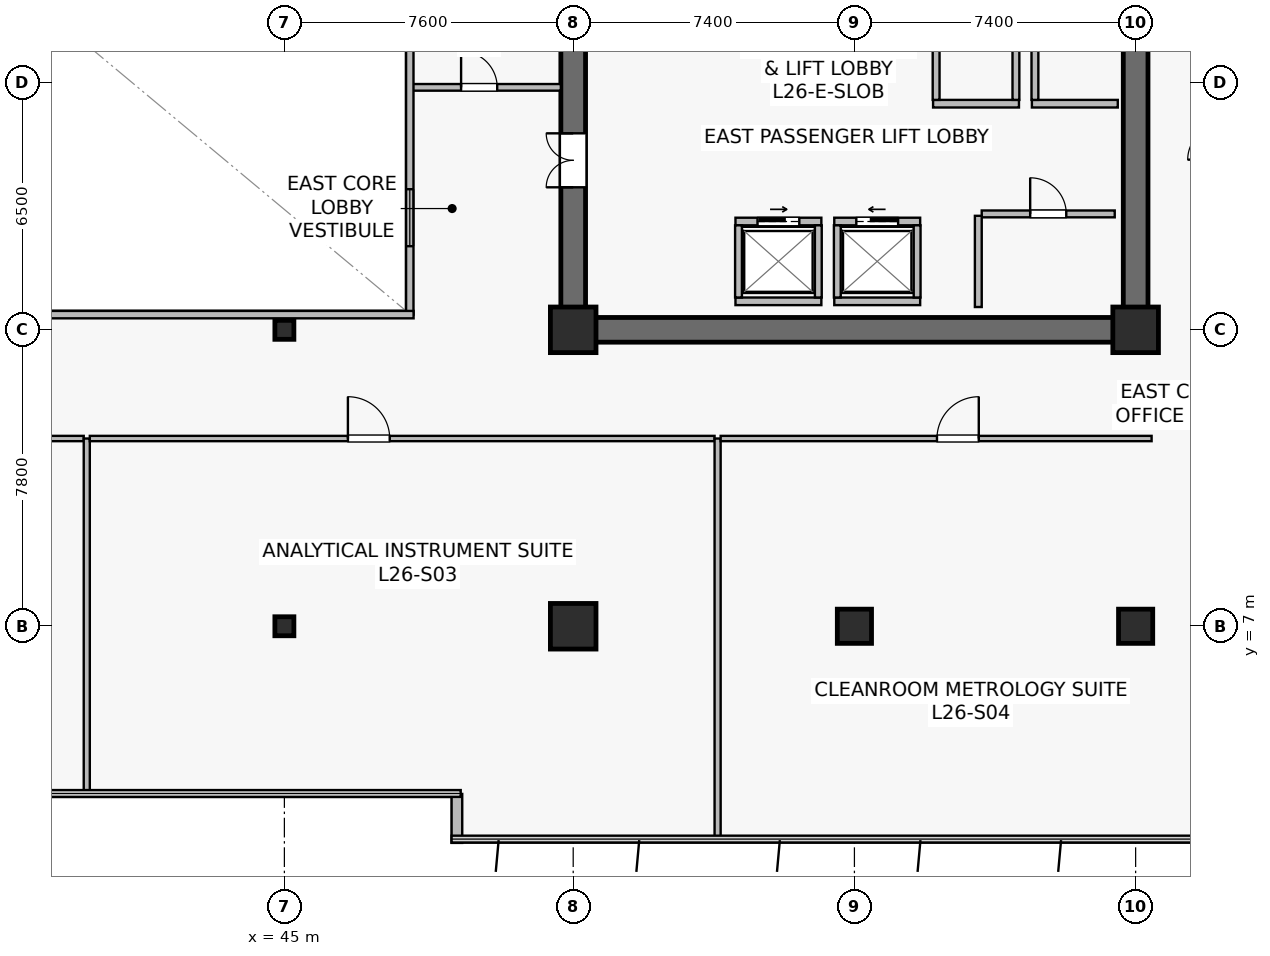
"""IFC4 building model, lengths in metres.
Left out: names, types, materials, properties, quantities, classifications, styles, units other than length and angle.
Written with IfcOpenShell. Run it as: python <this file> out.ifc"""

import sys

from ifc_helpers import new_model, si_unit, direction, frame, frame_2d, origin, origin_2d, place, context, subcontext, project, spatial, rectangle, hollow_rectangle, extrude, source, transform, mapped, element, fill, save


model = new_model("IFC4")
c1 = context("Model", 3, precision=1e-05, world=origin(), true_north=direction((0.0, 1.0)))
c2 = subcontext(c1, "Body", "Model", "MODEL_VIEW")
j1 = project(units=[si_unit("LENGTHUNIT", "METRE"), si_unit("PLANEANGLEUNIT", "RADIAN")], contexts=[c1])
p1 = place(None, origin())
s1 = spatial("IfcSite", under=j1, at=p1, CompositionType="ELEMENT")
p2 = place(p1, origin())
s2 = spatial("IfcBuilding", under=s1, at=p2, CompositionType="ELEMENT")
p3 = place(p2, frame((0.0, 0.0, 109.2)))
s3 = spatial("IfcBuildingStorey", under=s2, at=p3, CompositionType="ELEMENT", Elevation=109.2)
p4 = place(p3, frame((52.275, 14.8, 0.0), z_axis=(0.0, 0.0, 1.0), x_axis=(1.0, 0.0, 0.0)))
e1 = element("IfcWall", 1, at=p4, inside=s3, PredefinedType="SHEAR", context=c2, shape_type="SweptSolid", body=[
    extrude(rectangle(XDim=15.45, YDim=0.65, at=frame_2d((7.725, 0.0))), origin(), (0.0, 0.0, 1.0), 3.79),
])
p5 = place(p3, frame((52.6, 15.125, 0.0), z_axis=(0.0, 0.0, 1.0), x_axis=(0.0, 1.0, 0.0)))
e2 = element("IfcWall", 2, at=p5, inside=s3, PredefinedType="SHEAR", context=c2, shape_type="SweptSolid", body=[
    extrude(rectangle(XDim=18.35, YDim=0.65, at=frame_2d((9.175, 0.0))), origin(), (0.0, 0.0, 1.0), 3.79),
])
p6 = place(p5, frame((3.425, 0.0, 0.0)))
e3 = element("IfcOpeningElement", 3, at=p6, cuts=e2, PredefinedType="OPENING", context=c2, shape_type="SweptSolid", body=[
    extrude(rectangle(XDim=1.42, YDim=2.2, at=frame_2d((0.71, 1.1))), frame((0.0, 0.335, 0.0), z_axis=(0.0, -1.0, 0.0), x_axis=(1.0, 0.0, 0.0)), (0.0, 0.0, 1.0), 0.67),
])
p7 = place(p3, frame((67.4, 15.125, 0.0), z_axis=(0.0, 0.0, 1.0), x_axis=(0.0, 1.0, 0.0)))
e4 = element("IfcWall", 4, at=p7, inside=s3, PredefinedType="SHEAR", context=c2, shape_type="SweptSolid", body=[
    extrude(rectangle(XDim=18.35, YDim=0.65, at=frame_2d((9.175, 0.0))), origin(), (0.0, 0.0, 1.0), 3.79),
])
m1 = source(origin(), c2, "Body", "SweptSolid", [
    extrude(rectangle(XDim=1.2, YDim=1.2, at=origin_2d()), origin(), (0.0, 0.0, 1.0), 4.1),
])
p8 = place(p3, frame((52.6, 7.0, 0.0), z_axis=(0.0, 0.0, 1.0), x_axis=(1.0, 0.0, 0.0)))
e5 = element("IfcColumn", 5, at=p8, inside=s3, PredefinedType="COLUMN", context=c2, shape_type="MappedRepresentation", body=[
    mapped(m1, transform((0.0, 0.0, 0.0), scale=1.0)),
])
m2 = source(origin(), c2, "Body", "SweptSolid", [
    extrude(rectangle(XDim=0.9, YDim=0.9, at=origin_2d()), origin(), (0.0, 0.0, 1.0), 4.1),
])
p9 = place(p3, frame((60.0, 7.0, 0.0), z_axis=(0.0, 0.0, 1.0), x_axis=(1.0, 0.0, 0.0)))
e6 = element("IfcColumn", 6, at=p9, inside=s3, PredefinedType="COLUMN", context=c2, shape_type="MappedRepresentation", body=[
    mapped(m2, transform((0.0, 0.0, 0.0), scale=1.0)),
])
for number, where, z_axis, x_axis in (
    (7, (52.6, 14.8, 0.0), (0.0, 0.0, 1.0), (1.0, 0.0, 0.0)),
    (8, (67.4, 14.8, 0.0), (0.0, 0.0, 1.0), (1.0, 0.0, 0.0)),
):
    element("IfcColumn", number, at=place(p3, frame(where, z_axis=z_axis, x_axis=x_axis)), inside=s3, PredefinedType="COLUMN", context=c2, shape_type="MappedRepresentation", body=[
        mapped(m1, transform((0.0, 0.0, 0.0), scale=1.0)),
    ])
p10 = place(p3, frame((67.4, 7.0, 0.0), z_axis=(0.0, 0.0, 1.0), x_axis=(1.0, 0.0, 0.0)))
e9 = element("IfcColumn", 9, at=p10, inside=s3, PredefinedType="COLUMN", context=c2, shape_type="MappedRepresentation", body=[
    mapped(m2, transform((0.0, 0.0, 0.0), scale=1.0)),
])
m3 = source(origin(), c2, "Body", "SweptSolid", [
    extrude(hollow_rectangle(XDim=0.5, YDim=0.5, WallThickness=0.022, at=origin_2d()), origin(), (0.0, 0.0, 1.0), 4.1),
])
for number, where, z_axis, x_axis in (
    (10, (45.0, 7.0, 0.0), (0.0, 0.0, 1.0), (1.0, 0.0, 0.0)),
    (11, (45.0, 14.8, 0.0), (0.0, 0.0, 1.0), (1.0, 0.0, 0.0)),
):
    element("IfcColumn", number, at=place(p3, frame(where, z_axis=z_axis, x_axis=x_axis)), inside=s3, PredefinedType="COLUMN", context=c2, shape_type="MappedRepresentation", body=[
        mapped(m3, transform((0.0, 0.0, 0.0), scale=1.0)),
    ])
p11 = place(p3, frame((49.54, 2.588, 0.0), z_axis=(0.0, 0.0, 1.0), x_axis=(0.0, -1.0, 0.0)))
e12 = element("IfcWall", 12, at=p11, inside=s3, PredefinedType="STANDARD", context=c2, shape_type="SweptSolid", body=[
    extrude(rectangle(XDim=1.288, YDim=0.28, at=frame_2d((0.644, 0.0))), origin(), (0.0, 0.0, 1.0), 3.79),
])
p12 = place(p3, frame((59.47, 17.65, 0.0), z_axis=(0.0, 0.0, 1.0), x_axis=(1.0, 0.0, 0.0)))
e13 = element("IfcWall", 13, at=p12, inside=s3, PredefinedType="SOLIDWALL", context=c2, shape_type="SweptSolid", body=[
    extrude(rectangle(XDim=2.26, YDim=0.2, at=frame_2d((1.13, 0.0))), origin(), (0.0, 0.0, 1.0), 3.125),
])
p13 = place(p12, frame((0.58, 0.0, 0.0)))
e14 = element("IfcOpeningElement", 14, at=p13, cuts=e13, PredefinedType="OPENING", context=c2, shape_type="SweptSolid", body=[
    extrude(rectangle(XDim=1.1, YDim=2.22, at=frame_2d((0.55, 1.11))), frame((0.0, 0.11, 0.0), z_axis=(0.0, -1.0, 0.0), x_axis=(1.0, 0.0, 0.0)), (0.0, 0.0, 1.0), 0.22),
])
p14 = place(p3, frame((59.47, 15.55, 0.0), z_axis=(0.0, 0.0, 1.0), x_axis=(1.0, 0.0, 0.0)))
e15 = element("IfcWall", 15, at=p14, inside=s3, PredefinedType="SOLIDWALL", context=c2, shape_type="SweptSolid", body=[
    extrude(rectangle(XDim=2.26, YDim=0.2, at=frame_2d((1.13, 0.0))), origin(), (0.0, 0.0, 1.0), 3.125),
])
for number, where, z_axis, x_axis in (
    (16, (59.55, 15.65, 0.0), (0.0, 0.0, 1.0), (0.0, 1.0, 0.0)),
    (17, (61.65, 15.65, 0.0), (0.0, 0.0, 1.0), (0.0, 1.0, 0.0)),
):
    element("IfcWall", number, at=place(p3, frame(where, z_axis=z_axis, x_axis=x_axis)), inside=s3, PredefinedType="SOLIDWALL", context=c2, shape_type="SweptSolid", body=[
        extrude(rectangle(XDim=1.9, YDim=0.18, at=frame_2d((0.95, 0.0))), origin(), (0.0, 0.0, 1.0), 3.79),
    ])
p15 = place(p3, frame((56.87, 17.65, 0.0), z_axis=(0.0, 0.0, 1.0), x_axis=(1.0, 0.0, 0.0)))
e18 = element("IfcWall", 18, at=p15, inside=s3, PredefinedType="SOLIDWALL", context=c2, shape_type="SweptSolid", body=[
    extrude(rectangle(XDim=2.26, YDim=0.2, at=frame_2d((1.13, 0.0))), origin(), (0.0, 0.0, 1.0), 3.79),
])
p16 = place(p15, frame((0.58, 0.0, 0.0)))
e19 = element("IfcOpeningElement", 19, at=p16, cuts=e18, PredefinedType="OPENING", context=c2, shape_type="SweptSolid", body=[
    extrude(rectangle(XDim=1.1, YDim=2.22, at=frame_2d((0.55, 1.11))), frame((0.0, 0.11, 0.0), z_axis=(0.0, -1.0, 0.0), x_axis=(1.0, 0.0, 0.0)), (0.0, 0.0, 1.0), 0.22),
])
p17 = place(p3, frame((56.87, 15.55, 0.0), z_axis=(0.0, 0.0, 1.0), x_axis=(1.0, 0.0, 0.0)))
e20 = element("IfcWall", 20, at=p17, inside=s3, PredefinedType="SOLIDWALL", context=c2, shape_type="SweptSolid", body=[
    extrude(rectangle(XDim=2.26, YDim=0.2, at=frame_2d((1.13, 0.0))), origin(), (0.0, 0.0, 1.0), 3.79),
])
for number, where, z_axis, x_axis in (
    (21, (56.95, 15.65, 0.0), (0.0, 0.0, 1.0), (0.0, 1.0, 0.0)),
    (22, (59.05, 15.65, 0.0), (0.0, 0.0, 1.0), (0.0, 1.0, 0.0)),
):
    element("IfcWall", number, at=place(p3, frame(where, z_axis=z_axis, x_axis=x_axis)), inside=s3, PredefinedType="SOLIDWALL", context=c2, shape_type="SweptSolid", body=[
        extrude(rectangle(XDim=1.9, YDim=0.18, at=frame_2d((0.95, 0.0))), origin(), (0.0, 0.0, 1.0), 3.79),
    ])
p18 = place(p3, frame((64.67, 20.75, 0.0), z_axis=(0.0, 0.0, 1.0), x_axis=(1.0, 0.0, 0.0)))
e23 = element("IfcWall", 23, at=p18, inside=s3, PredefinedType="SOLIDWALL", context=c2, shape_type="SweptSolid", body=[
    extrude(rectangle(XDim=2.26, YDim=0.2, at=frame_2d((1.13, 0.0))), origin(), (0.0, 0.0, 1.0), 3.79),
])
p19 = place(p3, frame((64.75, 20.85, 0.0), z_axis=(0.0, 0.0, 1.0), x_axis=(0.0, 1.0, 0.0)))
e24 = element("IfcWall", 24, at=p19, inside=s3, PredefinedType="SOLIDWALL", context=c2, shape_type="SweptSolid", body=[
    extrude(rectangle(XDim=1.9, YDim=0.18, at=frame_2d((0.95, 0.0))), origin(), (0.0, 0.0, 1.0), 3.79),
])
p20 = place(p3, frame((62.07, 20.75, 0.0), z_axis=(0.0, 0.0, 1.0), x_axis=(1.0, 0.0, 0.0)))
e25 = element("IfcWall", 25, at=p20, inside=s3, PredefinedType="SOLIDWALL", context=c2, shape_type="SweptSolid", body=[
    extrude(rectangle(XDim=2.26, YDim=0.2, at=frame_2d((1.13, 0.0))), origin(), (0.0, 0.0, 1.0), 3.79),
])
for number, where, z_axis, x_axis in (
    (26, (62.15, 20.85, 0.0), (0.0, 0.0, 1.0), (0.0, 1.0, 0.0)),
    (27, (64.25, 20.85, 0.0), (0.0, 0.0, 1.0), (0.0, 1.0, 0.0)),
):
    element("IfcWall", number, at=place(p3, frame(where, z_axis=z_axis, x_axis=x_axis)), inside=s3, PredefinedType="SOLIDWALL", context=c2, shape_type="SweptSolid", body=[
        extrude(rectangle(XDim=1.9, YDim=0.18, at=frame_2d((0.95, 0.0))), origin(), (0.0, 0.0, 1.0), 3.79),
    ])
p21 = place(p3, frame((63.35, 17.85, 0.0), z_axis=(0.0, 0.0, 1.0), x_axis=(1.0, 0.0, 0.0)))
e28 = element("IfcWall", 28, at=p21, inside=s3, PredefinedType="SOLIDWALL", context=c2, shape_type="SweptSolid", body=[
    extrude(rectangle(XDim=3.5, YDim=0.18, at=frame_2d((1.75, 0.0))), origin(), (0.0, 0.0, 1.0), 3.79),
])
p22 = place(p21, frame((1.275, 0.0, 0.0)))
e29 = element("IfcOpeningElement", 29, at=p22, cuts=e28, PredefinedType="OPENING", context=c2, shape_type="SweptSolid", body=[
    extrude(rectangle(XDim=0.95, YDim=2.15, at=frame_2d((0.475, 1.075))), frame((0.0, 0.1, 0.0), z_axis=(0.0, -1.0, 0.0), x_axis=(1.0, 0.0, 0.0)), (0.0, 0.0, 1.0), 0.2),
])
p23 = place(p3, frame((63.26, 15.4, 0.0), z_axis=(0.0, 0.0, 1.0), x_axis=(0.0, 1.0, 0.0)))
e30 = element("IfcWall", 30, at=p23, inside=s3, PredefinedType="SOLIDWALL", context=c2, shape_type="SweptSolid", body=[
    extrude(rectangle(XDim=2.4, YDim=0.18, at=frame_2d((1.2, 0.0))), origin(), (0.0, 0.0, 1.0), 3.79),
])
p24 = place(p3, frame((48.3, 21.18, 0.0), z_axis=(0.0, 0.0, 1.0), x_axis=(1.0, 0.0, 0.0)))
e31 = element("IfcWall", 31, at=p24, inside=s3, PredefinedType="PARTITIONING", context=c2, shape_type="SweptSolid", body=[
    extrude(rectangle(XDim=3.975, YDim=0.175, at=frame_2d((1.987, 0.0))), origin(), (0.0, 0.0, 1.0), 3.79),
])
p25 = place(p24, frame((1.35, 0.0, 0.0)))
e32 = element("IfcOpeningElement", 32, at=p25, cuts=e31, PredefinedType="OPENING", context=c2, shape_type="SweptSolid", body=[
    extrude(rectangle(XDim=0.95, YDim=2.15, at=frame_2d((0.475, 1.075))), frame((0.0, 0.098, 0.0), z_axis=(0.0, -1.0, 0.0), x_axis=(1.0, 0.0, 0.0)), (0.0, 0.0, 1.0), 0.195),
])
p26 = place(p3, frame((48.3, 15.2, 0.0), z_axis=(0.0, 0.0, 1.0), x_axis=(0.0, 1.0, 0.0)))
e33 = element("IfcWall", 33, at=p26, inside=s3, PredefinedType="SOLIDWALL", context=c2, shape_type="SweptSolid", body=[
    extrude(rectangle(XDim=18.2, YDim=0.195, at=frame_2d((9.1, 0.0))), origin(), (0.0, 0.0, 1.0), 3.79),
])
p27 = place(p26, frame((1.8, 0.0, 0.9)))
e34 = element("IfcOpeningElement", 34, at=p27, cuts=e33, PredefinedType="OPENING", context=c2, shape_type="SweptSolid", body=[
    extrude(rectangle(XDim=1.5, YDim=1.4, at=frame_2d((0.75, 0.7))), frame((0.0, 0.107, 0.0), z_axis=(0.0, -1.0, 0.0), x_axis=(1.0, 0.0, 0.0)), (0.0, 0.0, 1.0), 0.215),
])
p28 = place(p26, frame((13.2, 0.0, 0.9)))
e35 = element("IfcOpeningElement", 35, at=p28, cuts=e33, PredefinedType="OPENING", context=c2, shape_type="SweptSolid", body=[
    extrude(rectangle(XDim=1.5, YDim=1.4, at=frame_2d((0.75, 0.7))), frame((0.0, 0.107, 0.0), z_axis=(0.0, -1.0, 0.0), x_axis=(1.0, 0.0, 0.0)), (0.0, 0.0, 1.0), 0.215),
])
p29 = place(p3, frame((26.4, 15.2, 0.0), z_axis=(0.0, 0.0, 1.0), x_axis=(1.0, 0.0, 0.0)))
e36 = element("IfcWall", 36, at=p29, inside=s3, PredefinedType="SOLIDWALL", context=c2, shape_type="SweptSolid", body=[
    extrude(rectangle(XDim=22.0, YDim=0.195, at=frame_2d((11.0, 0.0))), origin(), (0.0, 0.0, 1.0), 3.79),
])
p30 = place(p3, frame((20.68, 11.94, 0.0), z_axis=(0.0, 0.0, 1.0), x_axis=(1.0, 0.0, 0.0)))
e37 = element("IfcWall", 37, at=p30, inside=s3, PredefinedType="PARTITIONING", context=c2, shape_type="SweptSolid", body=[
    extrude(rectangle(XDim=19.04, YDim=0.14, at=frame_2d((9.52, 0.0))), origin(), (0.0, 0.0, 1.0), 3.125),
])
p31 = place(p30, frame((10.004, 0.0, 0.0)))
e38 = element("IfcOpeningElement", 38, at=p31, cuts=e37, PredefinedType="OPENING", context=c2, shape_type="SweptSolid", body=[
    extrude(rectangle(XDim=1.1, YDim=2.18, at=frame_2d((0.55, 1.09))), frame((0.0, 0.08, 0.0), z_axis=(0.0, -1.0, 0.0), x_axis=(1.0, 0.0, 0.0)), (0.0, 0.0, 1.0), 0.16),
])
p32 = place(p3, frame((39.8, 2.61, 0.0), z_axis=(0.0, 0.0, 1.0), x_axis=(0.0, 1.0, 0.0)))
e39 = element("IfcWall", 39, at=p32, inside=s3, PredefinedType="PARTITIONING", context=c2, shape_type="SweptSolid", body=[
    extrude(rectangle(XDim=9.33, YDim=0.16, at=frame_2d((4.665, 0.0))), origin(), (0.0, 0.0, 1.0), 3.075),
])
p33 = place(p3, frame((39.88, 11.94, 0.0), z_axis=(0.0, 0.0, 1.0), x_axis=(1.0, 0.0, 0.0)))
e40 = element("IfcWall", 40, at=p33, inside=s3, PredefinedType="PARTITIONING", context=c2, shape_type="SweptSolid", body=[
    extrude(rectangle(XDim=16.44, YDim=0.14, at=frame_2d((8.22, 0.0))), origin(), (0.0, 0.0, 1.0), 3.125),
])
p34 = place(p33, frame((6.792, 0.0, 0.0)))
e41 = element("IfcOpeningElement", 41, at=p34, cuts=e40, PredefinedType="OPENING", context=c2, shape_type="SweptSolid", body=[
    extrude(rectangle(XDim=1.1, YDim=2.18, at=frame_2d((0.55, 1.09))), frame((0.0, 0.08, 0.0), z_axis=(0.0, -1.0, 0.0), x_axis=(1.0, 0.0, 0.0)), (0.0, 0.0, 1.0), 0.16),
])
p35 = place(p3, frame((56.4, 1.41, 0.0), z_axis=(0.0, 0.0, 1.0), x_axis=(0.0, 1.0, 0.0)))
e42 = element("IfcWall", 42, at=p35, inside=s3, PredefinedType="PARTITIONING", context=c2, shape_type="SweptSolid", body=[
    extrude(rectangle(XDim=10.53, YDim=0.16, at=frame_2d((5.265, 0.0))), origin(), (0.0, 0.0, 1.0), 3.075),
])
p36 = place(p3, frame((56.48, 11.94, 0.0), z_axis=(0.0, 0.0, 1.0), x_axis=(1.0, 0.0, 0.0)))
e43 = element("IfcWall", 43, at=p36, inside=s3, PredefinedType="PARTITIONING", context=c2, shape_type="SweptSolid", body=[
    extrude(rectangle(XDim=11.34, YDim=0.14, at=frame_2d((5.67, 0.0))), origin(), (0.0, 0.0, 1.0), 3.125),
])
p37 = place(p36, frame((5.692, 0.0, 0.0)))
e44 = element("IfcOpeningElement", 44, at=p37, cuts=e43, PredefinedType="OPENING", context=c2, shape_type="SweptSolid", body=[
    extrude(rectangle(XDim=1.1, YDim=2.18, at=frame_2d((0.55, 1.09))), frame((0.0, 0.08, 0.0), z_axis=(0.0, -1.0, 0.0), x_axis=(1.0, 0.0, 0.0)), (0.0, 0.0, 1.0), 0.16),
])
m4 = source(origin(), c2, "Body", "SweptSolid", [
    extrude(rectangle(XDim=1.5, YDim=1.4, at=frame_2d((0.75, 0.7))), frame((0.0, 0.03, 0.0), z_axis=(0.0, -1.0, 0.0), x_axis=(1.0, 0.0, 0.0)), (0.0, 0.0, 1.0), 0.06),
])
p38 = place(p27, origin())
e45 = element("IfcWindow", 45, at=p38, inside=s3, PartitioningType="SINGLE_PANEL", PredefinedType="WINDOW", context=c2, shape_type="MappedRepresentation", body=[
    mapped(m4, transform((0.0, 0.0, 0.0), scale=1.0)),
])
fill(e34, e45)
m5 = source(origin(), c2, "Body", "SweptSolid", [
    extrude(rectangle(XDim=1.1, YDim=2.22, at=frame_2d((0.55, 1.11))), frame((0.0, 0.025, 0.0), z_axis=(0.0, -1.0, 0.0), x_axis=(1.0, 0.0, 0.0)), (0.0, 0.0, 1.0), 0.05),
])
p39 = place(p13, origin())
e46 = element("IfcDoor", 46, at=p39, inside=s3, OperationType="SLIDING_TO_LEFT", PredefinedType="USERDEFINED", context=c2, shape_type="MappedRepresentation", body=[
    mapped(m5, transform((0.0, 0.0, 0.0), scale=1.0)),
])
fill(e14, e46)
p40 = place(p16, origin())
e47 = element("IfcDoor", 47, at=p40, inside=s3, OperationType="SLIDING_TO_RIGHT", PredefinedType="USERDEFINED", context=c2, shape_type="MappedRepresentation", body=[
    mapped(m5, transform((0.0, 0.0, 0.0), scale=1.0)),
])
fill(e19, e47)
m6 = source(origin(), c2, "Body", "SweptSolid", [
    extrude(rectangle(XDim=0.95, YDim=2.15, at=frame_2d((0.475, 1.075))), frame((0.0, 0.025, 0.0), z_axis=(0.0, -1.0, 0.0), x_axis=(1.0, 0.0, 0.0)), (0.0, 0.0, 1.0), 0.05),
])
p41 = place(p22, origin())
e48 = element("IfcDoor", 48, at=p41, inside=s3, OperationType="SINGLE_SWING_LEFT", PredefinedType="DOOR", context=c2, shape_type="MappedRepresentation", body=[
    mapped(m6, transform((0.0, 0.0, 0.0), scale=1.0)),
])
fill(e29, e48)
m7 = source(origin(), c2, "Body", "SweptSolid", [
    extrude(rectangle(XDim=1.42, YDim=2.2, at=frame_2d((0.71, 1.1))), frame((0.0, 0.025, 0.0), z_axis=(0.0, -1.0, 0.0), x_axis=(1.0, 0.0, 0.0)), (0.0, 0.0, 1.0), 0.05),
])
p42 = place(p6, origin())
e49 = element("IfcDoor", 49, at=p42, inside=s3, OperationType="DOUBLE_DOOR_SINGLE_SWING", PredefinedType="DOOR", context=c2, shape_type="MappedRepresentation", body=[
    mapped(m7, transform((0.0, 0.0, 0.0), scale=1.0)),
])
fill(e3, e49)
p43 = place(p25, origin())
e50 = element("IfcDoor", 50, at=p43, inside=s3, OperationType="SINGLE_SWING_LEFT", PredefinedType="DOOR", context=c2, shape_type="MappedRepresentation", body=[
    mapped(m6, transform((0.0, 0.0, 0.0), scale=1.0)),
])
fill(e32, e50)
m8 = source(origin(), c2, "Body", "SweptSolid", [
    extrude(rectangle(XDim=1.1, YDim=2.18, at=frame_2d((0.55, 1.09))), frame((0.0, 0.025, 0.0), z_axis=(0.0, -1.0, 0.0), x_axis=(1.0, 0.0, 0.0)), (0.0, 0.0, 1.0), 0.05),
])
p44 = place(p34, origin())
e51 = element("IfcDoor", 51, at=p44, inside=s3, OperationType="SINGLE_SWING_LEFT", PredefinedType="DOOR", context=c2, shape_type="MappedRepresentation", body=[
    mapped(m8, transform((0.0, 0.0, 0.0), scale=1.0)),
])
fill(e41, e51)
p45 = place(p37, origin())
e52 = element("IfcDoor", 52, at=p45, inside=s3, OperationType="SINGLE_SWING_RIGHT", PredefinedType="DOOR", context=c2, shape_type="MappedRepresentation", body=[
    mapped(m8, transform((0.0, 0.0, 0.0), scale=1.0)),
])
fill(e44, e52)
save(model, sys.argv[1])
